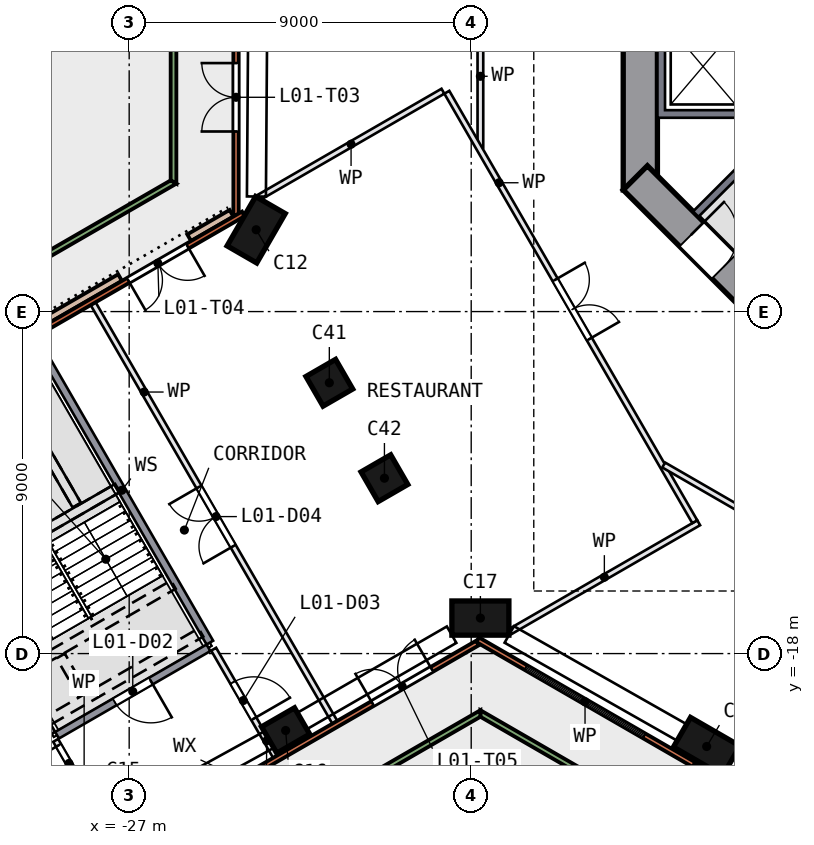
"""IFC4 building model, lengths in metres.
Left out: names, types, materials, properties, quantities, classifications, styles, units other than length and angle.
Written with IfcOpenShell. Run it as: python <this file> out.ifc"""

import sys

from ifc_helpers import new_model, si_unit, direction, frame, frame_2d, origin, origin_2d, place, context, subcontext, project, spatial, polyline, rectangle, outline, extrude, element, fill, save


model = new_model("IFC4")
c1 = context("Model", 3, precision=1e-05, world=origin(), true_north=direction((0.0, 1.0)))
c2 = subcontext(c1, "Body", "Model", "MODEL_VIEW")
j1 = project(units=[si_unit("LENGTHUNIT", "METRE"), si_unit("PLANEANGLEUNIT", "RADIAN")], contexts=[c1])
p1 = place(None, origin())
s1 = spatial("IfcSite", under=j1, at=p1, CompositionType="ELEMENT")
p2 = place(p1, origin())
s2 = spatial("IfcBuilding", under=s1, at=p2, CompositionType="ELEMENT")
p3 = place(p2, frame((0.0, 0.0, 8.0)))
s3 = spatial("IfcBuildingStorey", under=s2, at=p3, CompositionType="ELEMENT", Elevation=8.0)
p4 = place(p3, frame((-23.658, -6.846, 0.0), z_axis=(0.0, 0.0, 1.0), x_axis=(0.5, 0.866025404, 0.0)))
e1 = element("IfcColumn", 1, at=p4, inside=s3, PredefinedType="COLUMN", context=c2, shape_type="SweptSolid", body=[
    extrude(rectangle(XDim=1.5, YDim=0.9, at=origin_2d()), origin(), (0.0, 0.0, 1.0), 5.55),
])
p5 = place(p3, frame((-22.883, -20.024, 0.0), z_axis=(0.0, 0.0, 1.0), x_axis=(0.866025404, 0.5, 0.0)))
e2 = element("IfcColumn", 2, at=p5, inside=s3, PredefinedType="COLUMN", context=c2, shape_type="SweptSolid", body=[
    extrude(rectangle(XDim=1.0, YDim=0.8, at=origin_2d()), origin(), (0.0, 0.0, 1.0), 5.55),
])
for number, where, z_axis, x_axis in (
    (3, (-17.758, -17.065, 0.0), (0.0, 0.0, 1.0), (-1.0, 0.0, 0.0)),
    (4, (-11.804, -20.445, 0.0), (0.0, 0.0, 1.0), (0.866, -0.5, 0.0)),
):
    element("IfcColumn", number, at=place(p3, frame(where, z_axis=z_axis, x_axis=x_axis)), inside=s3, PredefinedType="COLUMN", context=c2, shape_type="SweptSolid", body=[
        extrude(rectangle(XDim=1.5, YDim=0.9, at=origin_2d()), origin(), (0.0, 0.0, 1.0), 5.55),
    ])
for number, where, z_axis, x_axis in (
    (5, (-21.733, -10.873, 0.0), (0.0, 0.0, 1.0), (-0.866, -0.5, 0.0)),
    (6, (-20.283, -13.385, 0.0), (0.0, 0.0, 1.0), (-0.866, -0.5, 0.0)),
):
    element("IfcColumn", number, at=place(p3, frame(where, z_axis=z_axis, x_axis=x_axis)), inside=s3, PredefinedType="COLUMN", context=c2, shape_type="SweptSolid", body=[
        extrude(rectangle(XDim=0.9, YDim=0.9, at=origin_2d()), origin(), (0.0, 0.0, 1.0), 5.55),
    ])
p6 = place(p3, frame((-13.55, 5.799, 0.0), z_axis=(0.0, 0.0, 1.0), x_axis=(0.0, -1.0, 0.0)))
e7 = element("IfcWall", 7, at=p6, inside=s3, PredefinedType="SHEAR", context=c2, shape_type="SweptSolid", body=[
    extrude(rectangle(XDim=11.598, YDim=0.9, at=frame_2d((5.799, 0.0))), origin(), (0.0, 0.0, 1.0), 6.0),
])
p7 = place(p6, frame((4.899, 0.0, 0.0)))
e8 = element("IfcOpeningElement", 8, at=p7, cuts=e7, PredefinedType="OPENING", context=c2, shape_type="SweptSolid", body=[
    extrude(rectangle(XDim=1.8, YDim=2.1, at=frame_2d((0.9, 1.05))), frame((0.0, 0.46, 0.0), z_axis=(0.0, -1.0, 0.0), x_axis=(1.0, 0.0, 0.0)), (0.0, 0.0, 1.0), 0.92),
])
p8 = place(p3, frame((-13.682, -5.481, 0.0), z_axis=(0.0, 0.0, 1.0), x_axis=(0.707106781, -0.707106781, 0.0)))
e9 = element("IfcWall", 9, at=p8, inside=s3, PredefinedType="SHEAR", context=c2, shape_type="SweptSolid", body=[
    extrude(rectangle(XDim=11.598, YDim=0.9, at=frame_2d((5.799, 0.0))), origin(), (0.0, 0.0, 1.0), 6.0),
])
p9 = place(p8, frame((2.099, 0.0, 0.0)))
e10 = element("IfcOpeningElement", 10, at=p9, cuts=e9, PredefinedType="OPENING", context=c2, shape_type="SweptSolid", body=[
    extrude(rectangle(XDim=1.2, YDim=2.1, at=frame_2d((0.6, 1.05))), frame((0.0, 0.46, 0.0), z_axis=(0.0, -1.0, 0.0), x_axis=(1.0, 0.0, 0.0)), (0.0, 0.0, 1.0), 0.92),
])
p10 = place(p3, frame((-24.188, -6.46, 0.0), z_axis=(0.0, 0.0, 1.0), x_axis=(0.0, 1.0, 0.0)))
e11 = element("IfcWall", 11, at=p10, inside=s3, PredefinedType="SOLIDWALL", context=c2, shape_type="SweptSolid", body=[
    extrude(rectangle(XDim=12.801, YDim=0.14, at=frame_2d((6.4, 0.0))), origin(), (0.0, 0.0, 1.0), 5.55),
])
p11 = place(p10, frame((8.053, 0.0, 0.9)))
e12 = element("IfcOpeningElement", 12, at=p11, cuts=e11, PredefinedType="OPENING", context=c2, shape_type="SweptSolid", body=[
    extrude(rectangle(XDim=3.0, YDim=3.6, at=frame_2d((1.5, 1.8))), frame((0.0, 0.08, 0.0), z_axis=(0.0, -1.0, 0.0), x_axis=(1.0, 0.0, 0.0)), (0.0, 0.0, 1.0), 0.16),
])
p12 = place(p10, frame((2.198, 0.0, 0.0)))
e13 = element("IfcOpeningElement", 13, at=p12, cuts=e11, PredefinedType="OPENING", context=c2, shape_type="SweptSolid", body=[
    extrude(rectangle(XDim=1.8, YDim=2.4, at=frame_2d((0.9, 1.2))), frame((0.0, 0.08, 0.0), z_axis=(0.0, -1.0, 0.0), x_axis=(1.0, 0.0, 0.0)), (0.0, 0.0, 1.0), 0.16),
])
p13 = place(p3, frame((-23.995, -6.429, 0.0), z_axis=(0.0, 0.0, 1.0), x_axis=(-0.866018753, -0.500011519, 0.0)))
e14 = element("IfcWall", 14, at=p13, inside=s3, PredefinedType="SOLIDWALL", context=c2, shape_type="SweptSolid", body=[
    extrude(rectangle(XDim=11.405, YDim=0.14, at=frame_2d((5.703, 0.0))), origin(), (0.0, 0.0, 1.0), 5.55),
])
p14 = place(p13, frame((1.698, 0.0, 0.0)))
e15 = element("IfcOpeningElement", 15, at=p14, cuts=e14, PredefinedType="OPENING", context=c2, shape_type="SweptSolid", body=[
    extrude(rectangle(XDim=1.8, YDim=2.4, at=frame_2d((0.9, 1.2))), frame((0.0, 0.08, 0.0), z_axis=(0.0, -1.0, 0.0), x_axis=(1.0, 0.0, 0.0)), (0.0, 0.0, 1.0), 0.16),
])
p15 = place(p3, frame((-27.321, -23.198, 0.0), z_axis=(0.0, 0.0, 1.0), x_axis=(0.866030546, 0.499991093, 0.0)))
e16 = element("IfcWall", 16, at=p15, inside=s3, PredefinedType="SOLIDWALL", context=c2, shape_type="SweptSolid", body=[
    extrude(rectangle(XDim=10.961, YDim=0.14, at=frame_2d((5.48, 0.0))), origin(), (0.0, 0.0, 1.0), 5.55),
])
p16 = place(p15, frame((7.767, 0.0, 0.0)))
e17 = element("IfcOpeningElement", 17, at=p16, cuts=e16, PredefinedType="OPENING", context=c2, shape_type="SweptSolid", body=[
    extrude(rectangle(XDim=1.8, YDim=2.4, at=frame_2d((0.9, 1.2))), frame((0.0, 0.08, 0.0), z_axis=(0.0, -1.0, 0.0), x_axis=(1.0, 0.0, 0.0)), (0.0, 0.0, 1.0), 0.16),
])
p17 = place(p3, frame((-17.828, -17.637, 0.0), z_axis=(0.0, 0.0, 1.0), x_axis=(0.866029009, -0.499993756, 0.0)))
e18 = element("IfcWall", 18, at=p17, inside=s3, PredefinedType="SOLIDWALL", context=c2, shape_type="SweptSolid", body=[
    extrude(rectangle(XDim=13.242, YDim=0.14, at=frame_2d((6.621, 0.0))), origin(), (0.0, 0.0, 1.0), 5.55),
])
p18 = place(p17, frame((1.46, 0.0, 0.9)))
e19 = element("IfcOpeningElement", 19, at=p18, cuts=e18, PredefinedType="OPENING", context=c2, shape_type="SweptSolid", body=[
    extrude(rectangle(XDim=3.6, YDim=3.6, at=frame_2d((1.8, 1.8))), frame((0.0, 0.08, 0.0), z_axis=(0.0, -1.0, 0.0), x_axis=(1.0, 0.0, 0.0)), (0.0, 0.0, 1.0), 0.16),
])
p19 = place(p17, frame((8.215, 0.0, 0.9)))
e20 = element("IfcOpeningElement", 20, at=p19, cuts=e18, PredefinedType="OPENING", context=c2, shape_type="SweptSolid", body=[
    extrude(rectangle(XDim=3.0, YDim=3.6, at=frame_2d((1.5, 1.8))), frame((0.0, 0.08, 0.0), z_axis=(0.0, -1.0, 0.0), x_axis=(1.0, 0.0, 0.0)), (0.0, 0.0, 1.0), 0.16),
])
p20 = place(p3, origin())
e21 = element("IfcWall", 21, at=p20, inside=s3, PredefinedType="SOLIDWALL", context=c2, shape_type="SweptSolid", body=[
    extrude(outline(polyline([(-33.907, -12.071), (-27.19, -8.192), (-27.29, -8.019), (-33.898, -11.834), (-33.907, -12.071)])), origin(), (0.0, 0.0, 1.0), 0.45),
])
p21 = place(p3, origin())
e22 = element("IfcWall", 22, at=p21, inside=s3, PredefinedType="SOLIDWALL", context=c2, shape_type="SweptSolid", body=[
    extrude(outline(polyline([(-24.358, -6.327), (-25.471, -6.969), (-25.371, -7.142), (-24.258, -6.5), (-24.358, -6.327)])), origin(), (0.0, 0.0, 1.0), 0.45),
])
p22 = place(p3, origin())
e23 = element("IfcWall", 23, at=p22, inside=s3, PredefinedType="SOLIDWALL", context=c2, shape_type="SweptSolid", body=[
    extrude(outline(polyline([(-25.758, -5.634), (-25.758, -0.5), (-25.908, -0.65), (-25.908, -5.547), (-25.758, -5.634)])), origin(), (0.0, 0.0, 1.0), 0.6),
])
p23 = place(p3, origin())
e24 = element("IfcWall", 24, at=p23, inside=s3, PredefinedType="SOLIDWALL", context=c2, shape_type="SweptSolid", body=[
    extrude(outline(polyline([(-32.5, -9.526), (-25.758, -5.634), (-25.908, -5.547), (-32.35, -9.267), (-32.5, -9.526)])), origin(), (0.0, 0.0, 1.0), 0.6),
])
p24 = place(p3, origin())
e25 = element("IfcWall", 25, at=p24, inside=s3, PredefinedType="SOLIDWALL", context=c2, shape_type="SweptSolid", body=[
    extrude(outline(polyline([(-14.278, -21.5), (-17.758, -19.49), (-17.758, -19.664), (-14.837, -21.35), (-14.278, -21.5)])), origin(), (0.0, 0.0, 1.0), 0.6),
])
p25 = place(p3, origin())
e26 = element("IfcWall", 26, at=p25, inside=s3, PredefinedType="SOLIDWALL", context=c2, shape_type="SweptSolid", body=[
    extrude(outline(polyline([(-17.758, -19.49), (-21.239, -21.5), (-20.679, -21.35), (-17.758, -19.664), (-17.758, -19.49)])), origin(), (0.0, 0.0, 1.0), 0.6),
])
p26 = place(p3, origin())
e27 = element("IfcWall", 27, at=p26, inside=s3, PredefinedType="SOLIDWALL", context=c2, shape_type="SweptSolid", body=[
    extrude(outline(polyline([(-13.1, -3.9), (-13.1, -1.2), (-10.9, -1.2), (-10.9, -1.4), (-12.9, -1.4), (-12.9, -3.7), (-10.9, -3.7), (-10.9, -3.9), (-13.1, -3.9)])), origin(), (0.0, 0.0, 1.0), 5.55),
])
p27 = place(p3, frame((-9.334, -3.677, 0.0), z_axis=(0.0, 0.0, 1.0), x_axis=(-0.707106781, -0.707106781, 0.0)))
e28 = element("IfcWall", 28, at=p27, inside=s3, PredefinedType="SOLIDWALL", context=c2, shape_type="SweptSolid", body=[
    extrude(rectangle(XDim=3.9, YDim=0.2, at=frame_2d((1.95, 0.0))), origin(), (0.0, 0.0, 1.0), 5.55),
])
p28 = place(p3, frame((-32.807, -13.577, 0.0), z_axis=(0.0, 0.0, 1.0), x_axis=(0.50000534, -0.866022321, 0.0)))
e29 = element("IfcWall", 29, at=p28, inside=s3, PredefinedType="SOLIDWALL", context=c2, shape_type="SweptSolid", body=[
    extrude(rectangle(XDim=7.545, YDim=0.2, at=frame_2d((3.773, 0.0))), origin(), (0.0, 0.0, 1.0), 5.55),
])
p29 = place(p3, frame((-28.162, -21.623, 0.0), z_axis=(0.0, 0.0, 1.0), x_axis=(-0.499877454, 0.866096144, 0.0)))
e30 = element("IfcWall", 30, at=p29, inside=s3, PredefinedType="PARTITIONING", context=c2, shape_type="SweptSolid", body=[
    extrude(rectangle(XDim=1.545, YDim=0.15, at=frame_2d((0.773, 0.0))), origin(), (0.0, 0.0, 1.0), 5.55),
])
p30 = place(p29, frame((0.295, 0.0, 0.0)))
e31 = element("IfcOpeningElement", 31, at=p30, cuts=e30, PredefinedType="OPENING", context=c2, shape_type="SweptSolid", body=[
    extrude(rectangle(XDim=1.1, YDim=2.1, at=frame_2d((0.55, 1.05))), frame((0.0, 0.085, 0.0), z_axis=(0.0, -1.0, 0.0), x_axis=(1.0, 0.0, 0.0)), (0.0, 0.0, 1.0), 0.17),
])
p31 = place(p3, frame((-24.914, -17.848, 0.0), z_axis=(0.0, 0.0, 1.0), x_axis=(-0.86601677, -0.500014953, 0.0)))
e32 = element("IfcWall", 32, at=p31, inside=s3, PredefinedType="SOLIDWALL", context=c2, shape_type="SweptSolid", body=[
    extrude(rectangle(XDim=4.6, YDim=0.2, at=frame_2d((2.3, 0.0))), origin(), (0.0, 0.0, 1.0), 5.55),
])
p32 = place(p31, frame((1.75, 0.0, 0.0)))
e33 = element("IfcOpeningElement", 33, at=p32, cuts=e32, PredefinedType="OPENING", context=c2, shape_type="SweptSolid", body=[
    extrude(rectangle(XDim=1.1, YDim=2.1, at=frame_2d((0.55, 1.05))), frame((0.0, 0.11, 0.0), z_axis=(0.0, -1.0, 0.0), x_axis=(1.0, 0.0, 0.0)), (0.0, 0.0, 1.0), 0.22),
])
p33 = place(p3, frame((-24.877, -17.712, 0.0), z_axis=(0.0, 0.0, 1.0), x_axis=(-0.499984148, 0.866034555, 0.0)))
e34 = element("IfcWall", 34, at=p33, inside=s3, PredefinedType="SOLIDWALL", context=c2, shape_type="SweptSolid", body=[
    extrude(rectangle(XDim=9.26, YDim=0.2, at=frame_2d((4.63, 0.0))), origin(), (0.0, 0.0, 1.0), 5.55),
])
p34 = place(p3, frame((-24.777, -17.885, 0.0), z_axis=(0.0, 0.0, 1.0), x_axis=(0.499996863, -0.866027215, 0.0)))
e35 = element("IfcWall", 35, at=p34, inside=s3, PredefinedType="PARTITIONING", context=c2, shape_type="SweptSolid", body=[
    extrude(rectangle(XDim=3.26, YDim=0.15, at=frame_2d((1.63, 0.0))), origin(), (0.0, 0.0, 1.0), 5.55),
])
p35 = place(p34, frame((1.01, 0.0, 0.0)))
e36 = element("IfcOpeningElement", 36, at=p35, cuts=e35, PredefinedType="OPENING", context=c2, shape_type="SweptSolid", body=[
    extrude(rectangle(XDim=1.1, YDim=2.1, at=frame_2d((0.55, 1.05))), frame((0.0, 0.085, 0.0), z_axis=(0.0, -1.0, 0.0), x_axis=(1.0, 0.0, 0.0)), (0.0, 0.0, 1.0), 0.17),
])
p36 = place(p3, frame((-21.588, -19.808, 0.0), z_axis=(0.0, 0.0, 1.0), x_axis=(-0.499991053, 0.866030569, 0.0)))
e37 = element("IfcWall", 37, at=p36, inside=s3, PredefinedType="PARTITIONING", context=c2, shape_type="SweptSolid", body=[
    extrude(rectangle(XDim=12.72, YDim=0.15, at=frame_2d((6.36, 0.0))), origin(), (0.0, 0.0, 1.0), 5.55),
])
p37 = place(p36, frame((5.35, 0.0, 0.0)))
e38 = element("IfcOpeningElement", 38, at=p37, cuts=e37, PredefinedType="OPENING", context=c2, shape_type="SweptSolid", body=[
    extrude(rectangle(XDim=1.8, YDim=2.1, at=frame_2d((0.9, 1.05))), frame((0.0, 0.085, 0.0), z_axis=(0.0, -1.0, 0.0), x_axis=(1.0, 0.0, 0.0)), (0.0, 0.0, 1.0), 0.17),
])
p38 = place(p3, frame((-18.744, -3.201, 0.0), z_axis=(0.0, 0.0, 1.0), x_axis=(-0.866027538, -0.499996304, 0.0)))
e39 = element("IfcWall", 39, at=p38, inside=s3, PredefinedType="PARTITIONING", context=c2, shape_type="SweptSolid", body=[
    extrude(rectangle(XDim=5.582, YDim=0.15, at=frame_2d((2.791, 0.0))), origin(), (0.0, 0.0, 1.0), 5.55),
])
p39 = place(p3, frame((-17.758, 4.833, 0.0), z_axis=(0.0, 0.0, 1.0), x_axis=(0.0, -1.0, 0.0)))
e40 = element("IfcWall", 40, at=p39, inside=s3, PredefinedType="PARTITIONING", context=c2, shape_type="SweptSolid", body=[
    extrude(rectangle(XDim=9.517, YDim=0.15, at=frame_2d((4.758, 0.0))), origin(), (0.0, 0.0, 1.0), 5.55),
])
p40 = place(p39, frame((3.767, 0.0, 0.0)))
e41 = element("IfcOpeningElement", 41, at=p40, cuts=e40, PredefinedType="OPENING", context=c2, shape_type="SweptSolid", body=[
    extrude(rectangle(XDim=1.8, YDim=2.1, at=frame_2d((0.9, 1.05))), frame((0.0, 0.085, 0.0), z_axis=(0.0, -1.0, 0.0), x_axis=(1.0, 0.0, 0.0)), (0.0, 0.0, 1.0), 0.17),
])
p41 = place(p3, frame((-16.978, -17.424, 0.0), z_axis=(0.0, 0.0, 1.0), x_axis=(0.866011812, 0.500023541, 0.0)))
e42 = element("IfcWall", 42, at=p41, inside=s3, PredefinedType="PARTITIONING", context=c2, shape_type="SweptSolid", body=[
    extrude(rectangle(XDim=5.732, YDim=0.15, at=frame_2d((2.866, 0.0))), origin(), (0.0, 0.0, 1.0), 5.55),
])
p42 = place(p3, frame((-18.642, -3.229, 0.0), z_axis=(0.0, 0.0, 1.0), x_axis=(0.499998298, -0.866026387, 0.0)))
e43 = element("IfcWall", 43, at=p42, inside=s3, PredefinedType="PARTITIONING", context=c2, shape_type="SweptSolid", body=[
    extrude(rectangle(XDim=13.05, YDim=0.15, at=frame_2d((6.525, 0.0))), origin(), (0.0, 0.0, 1.0), 5.55),
])
p43 = place(p42, frame((5.7, 0.0, 0.0)))
e44 = element("IfcOpeningElement", 44, at=p43, cuts=e43, PredefinedType="OPENING", context=c2, shape_type="SweptSolid", body=[
    extrude(rectangle(XDim=1.8, YDim=2.1, at=frame_2d((0.9, 1.05))), frame((0.0, 0.085, 0.0), z_axis=(0.0, -1.0, 0.0), x_axis=(1.0, 0.0, 0.0)), (0.0, 0.0, 1.0), 0.17),
])
p44 = place(p3, frame((-12.935, -13.038, 0.0), z_axis=(0.0, 0.0, 1.0), x_axis=(0.866027519, -0.499996337, 0.0)))
e45 = element("IfcWall", 45, at=p44, inside=s3, PredefinedType="PARTITIONING", context=c2, shape_type="SweptSolid", body=[
    extrude(rectangle(XDim=9.517, YDim=0.15, at=frame_2d((4.758, 0.0))), origin(), (0.0, 0.0, 1.0), 5.55),
])
p45 = place(p44, frame((3.767, 0.0, 0.0)))
e46 = element("IfcOpeningElement", 46, at=p45, cuts=e45, PredefinedType="OPENING", context=c2, shape_type="SweptSolid", body=[
    extrude(rectangle(XDim=1.8, YDim=2.1, at=frame_2d((0.9, 1.05))), frame((0.0, 0.085, 0.0), z_axis=(0.0, -1.0, 0.0), x_axis=(1.0, 0.0, 0.0)), (0.0, 0.0, 1.0), 0.17),
])
p46 = place(p12, origin())
e47 = element("IfcDoor", 47, at=p46, inside=s3, OperationType="DOUBLE_DOOR_SINGLE_SWING", PredefinedType="DOOR", context=c2, shape_type="SweptSolid", body=[
    extrude(rectangle(XDim=1.8, YDim=2.4, at=frame_2d((0.9, 1.2))), frame((0.0, 0.025, 0.0), z_axis=(0.0, -1.0, 0.0), x_axis=(1.0, 0.0, 0.0)), (0.0, 0.0, 1.0), 0.05),
])
fill(e13, e47)
p47 = place(p14, origin())
e48 = element("IfcDoor", 48, at=p47, inside=s3, OperationType="DOUBLE_DOOR_SINGLE_SWING", PredefinedType="DOOR", context=c2, shape_type="SweptSolid", body=[
    extrude(rectangle(XDim=1.8, YDim=2.4, at=frame_2d((0.9, 1.2))), frame((0.0, 0.025, 0.0), z_axis=(0.0, -1.0, 0.0), x_axis=(1.0, 0.0, 0.0)), (0.0, 0.0, 1.0), 0.05),
])
fill(e15, e48)
p48 = place(p16, origin())
e49 = element("IfcDoor", 49, at=p48, inside=s3, OperationType="DOUBLE_DOOR_SINGLE_SWING", PredefinedType="DOOR", context=c2, shape_type="SweptSolid", body=[
    extrude(rectangle(XDim=1.8, YDim=2.4, at=frame_2d((0.9, 1.2))), frame((0.0, 0.025, 0.0), z_axis=(0.0, -1.0, 0.0), x_axis=(1.0, 0.0, 0.0)), (0.0, 0.0, 1.0), 0.05),
])
fill(e17, e49)
p49 = place(p18, origin())
e50 = element("IfcWindow", 50, at=p49, inside=s3, PartitioningType="SINGLE_PANEL", PredefinedType="WINDOW", context=c2, shape_type="SweptSolid", body=[
    extrude(rectangle(XDim=3.6, YDim=3.6, at=frame_2d((1.8, 1.8))), frame((0.0, 0.03, 0.0), z_axis=(0.0, -1.0, 0.0), x_axis=(1.0, 0.0, 0.0)), (0.0, 0.0, 1.0), 0.06),
])
fill(e19, e50)
p50 = place(p9, origin())
e51 = element("IfcDoor", 51, at=p50, inside=s3, OperationType="SINGLE_SWING_LEFT", PredefinedType="DOOR", context=c2, shape_type="SweptSolid", body=[
    extrude(rectangle(XDim=1.2, YDim=2.1, at=frame_2d((0.6, 1.05))), frame((0.0, 0.025, 0.0), z_axis=(0.0, -1.0, 0.0), x_axis=(1.0, 0.0, 0.0)), (0.0, 0.0, 1.0), 0.05),
])
fill(e10, e51)
p51 = place(p30, origin())
e52 = element("IfcDoor", 52, at=p51, inside=s3, OperationType="SINGLE_SWING_RIGHT", PredefinedType="DOOR", context=c2, shape_type="SweptSolid", body=[
    extrude(rectangle(XDim=1.1, YDim=2.1, at=frame_2d((0.55, 1.05))), frame((0.0, 0.025, 0.0), z_axis=(0.0, -1.0, 0.0), x_axis=(1.0, 0.0, 0.0)), (0.0, 0.0, 1.0), 0.05),
])
fill(e31, e52)
p52 = place(p32, origin())
e53 = element("IfcDoor", 53, at=p52, inside=s3, OperationType="SINGLE_SWING_LEFT", PredefinedType="DOOR", context=c2, shape_type="SweptSolid", body=[
    extrude(rectangle(XDim=1.1, YDim=2.1, at=frame_2d((0.55, 1.05))), frame((0.0, 0.025, 0.0), z_axis=(0.0, -1.0, 0.0), x_axis=(1.0, 0.0, 0.0)), (0.0, 0.0, 1.0), 0.05),
])
fill(e33, e53)
p53 = place(p35, origin())
e54 = element("IfcDoor", 54, at=p53, inside=s3, OperationType="SINGLE_SWING_RIGHT", PredefinedType="DOOR", context=c2, shape_type="SweptSolid", body=[
    extrude(rectangle(XDim=1.1, YDim=2.1, at=frame_2d((0.55, 1.05))), frame((0.0, 0.025, 0.0), z_axis=(0.0, -1.0, 0.0), x_axis=(1.0, 0.0, 0.0)), (0.0, 0.0, 1.0), 0.05),
])
fill(e36, e54)
p54 = place(p37, origin())
e55 = element("IfcDoor", 55, at=p54, inside=s3, OperationType="DOUBLE_DOOR_SINGLE_SWING", PredefinedType="DOOR", context=c2, shape_type="SweptSolid", body=[
    extrude(rectangle(XDim=1.8, YDim=2.1, at=frame_2d((0.9, 1.05))), frame((0.0, 0.025, 0.0), z_axis=(0.0, -1.0, 0.0), x_axis=(1.0, 0.0, 0.0)), (0.0, 0.0, 1.0), 0.05),
])
fill(e38, e55)
p55 = place(p43, origin())
e56 = element("IfcDoor", 56, at=p55, inside=s3, OperationType="DOUBLE_DOOR_SINGLE_SWING", PredefinedType="DOOR", context=c2, shape_type="SweptSolid", body=[
    extrude(rectangle(XDim=1.8, YDim=2.1, at=frame_2d((0.9, 1.05))), frame((0.0, 0.025, 0.0), z_axis=(0.0, -1.0, 0.0), x_axis=(1.0, 0.0, 0.0)), (0.0, 0.0, 1.0), 0.05),
])
fill(e44, e56)
save(model, sys.argv[1])
